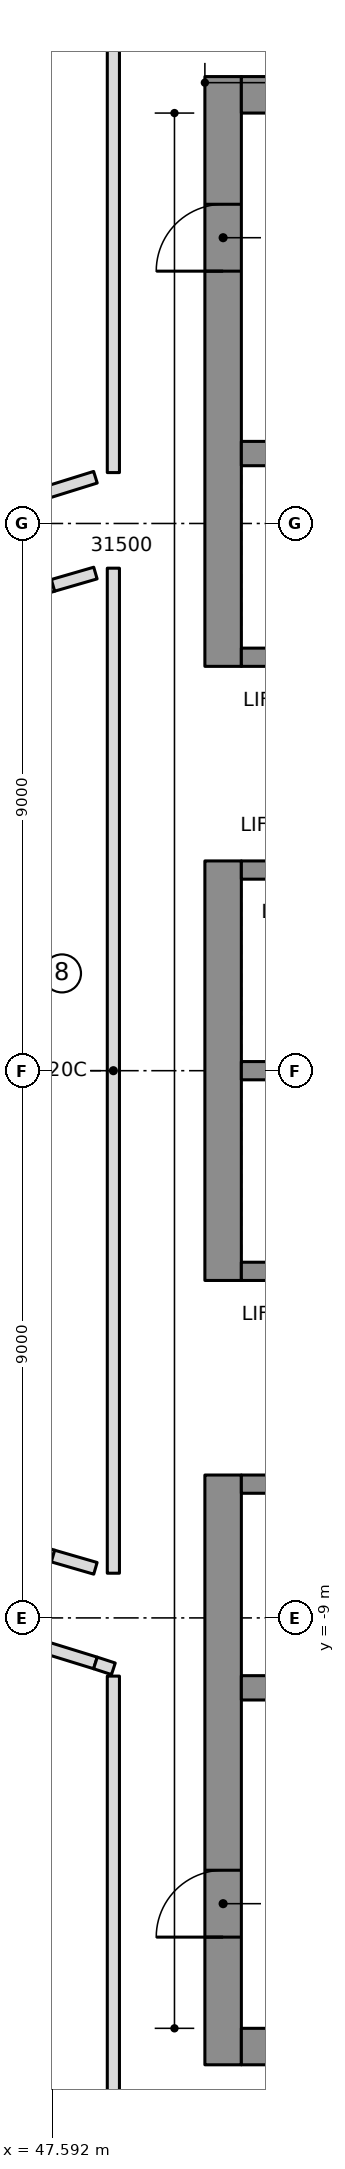
"""IFC4 building model, lengths in metres.
Left out: names, types, materials, properties, quantities, classifications, styles, units other than length and angle.
Written with IfcOpenShell. Run it as: python <this file> out.ifc"""

import sys

from ifc_helpers import new_model, si_unit, direction, frame, frame_2d, origin, place, context, subcontext, project, spatial, rectangle, extrude, element, fill, save


model = new_model("IFC4")
c1 = context("Model", 3, precision=1e-05, world=origin(), true_north=direction((0.0, 1.0)))
c2 = subcontext(c1, "Body", "Model", "MODEL_VIEW")
j1 = project(units=[si_unit("LENGTHUNIT", "METRE"), si_unit("PLANEANGLEUNIT", "RADIAN")], contexts=[c1])
p1 = place(None, origin())
s1 = spatial("IfcSite", under=j1, at=p1, CompositionType="ELEMENT")
p2 = place(p1, origin())
s2 = spatial("IfcBuilding", under=s1, at=p2, CompositionType="ELEMENT")
p3 = place(p2, frame((0.0, 0.0, 231.45)))
s3 = spatial("IfcBuildingStorey", under=s2, at=p3, CompositionType="ELEMENT", Elevation=231.45)
p4 = place(p3, frame((50.4, 6.65, 0.0), z_axis=(0.0, 0.0, 1.0), x_axis=(0.0, 1.0, 0.0)))
e1 = element("IfcWall", 1, at=p4, inside=s3, PredefinedType="SHEAR", context=c2, shape_type="SweptSolid", body=[
    extrude(rectangle(XDim=9.7, YDim=0.6, at=frame_2d((4.85, 0.0))), origin(), (0.0, 0.0, 1.0), 3.55),
])
p5 = place(p4, frame((6.5, 0.0, 0.0)))
e2 = element("IfcOpeningElement", 2, at=p5, cuts=e1, PredefinedType="OPENING", context=c2, shape_type="SweptSolid", body=[
    extrude(rectangle(XDim=1.1, YDim=2.1, at=frame_2d((0.55, 1.05))), frame((0.0, 0.31, 0.0), z_axis=(0.0, -1.0, 0.0), x_axis=(1.0, 0.0, 0.0)), (0.0, 0.0, 1.0), 0.62),
])
p6 = place(p3, frame((50.4, -3.45, 0.0), z_axis=(0.0, 0.0, 1.0), x_axis=(0.0, 1.0, 0.0)))
e3 = element("IfcWall", 3, at=p6, inside=s3, PredefinedType="SHEAR", context=c2, shape_type="SweptSolid", body=[
    extrude(rectangle(XDim=6.9, YDim=0.6, at=frame_2d((3.45, 0.0))), origin(), (0.0, 0.0, 1.0), 3.55),
])
p7 = place(p3, frame((50.4, -16.35, 0.0), z_axis=(0.0, 0.0, 1.0), x_axis=(0.0, 1.0, 0.0)))
e4 = element("IfcWall", 4, at=p7, inside=s3, PredefinedType="SHEAR", context=c2, shape_type="SweptSolid", body=[
    extrude(rectangle(XDim=9.7, YDim=0.6, at=frame_2d((4.85, 0.0))), origin(), (0.0, 0.0, 1.0), 3.55),
])
p8 = place(p7, frame((2.1, 0.0, 0.0)))
e5 = element("IfcOpeningElement", 5, at=p8, cuts=e4, PredefinedType="OPENING", context=c2, shape_type="SweptSolid", body=[
    extrude(rectangle(XDim=1.1, YDim=2.1, at=frame_2d((0.55, 1.05))), frame((0.0, 0.31, 0.0), z_axis=(0.0, -1.0, 0.0), x_axis=(1.0, 0.0, 0.0)), (0.0, 0.0, 1.0), 0.62),
])
for number, where, z_axis, x_axis in (
    (6, (50.7, 16.05, 0.0), (0.0, 0.0, 1.0), (1.0, 0.0, 0.0)),
    (7, (50.7, -16.05, 0.0), (0.0, 0.0, 1.0), (1.0, 0.0, 0.0)),
):
    element("IfcWall", number, at=place(p3, frame(where, z_axis=z_axis, x_axis=x_axis)), inside=s3, PredefinedType="SHEAR", context=c2, shape_type="SweptSolid", body=[
        extrude(rectangle(XDim=13.62, YDim=0.6, at=frame_2d((6.81, 0.0))), origin(), (0.0, 0.0, 1.0), 3.55),
    ])
p9 = place(p3, frame((50.7, 10.15, 0.0), z_axis=(0.0, 0.0, 1.0), x_axis=(1.0, 0.0, 0.0)))
e8 = element("IfcWall", 8, at=p9, inside=s3, PredefinedType="SHEAR", context=c2, shape_type="SweptSolid", body=[
    extrude(rectangle(XDim=13.02, YDim=0.4, at=frame_2d((6.51, 0.0))), origin(), (0.0, 0.0, 1.0), 3.55),
])
p10 = place(p9, frame((0.7, 0.0, 0.0)))
e9 = element("IfcOpeningElement", 9, at=p10, cuts=e8, PredefinedType="OPENING", context=c2, shape_type="SweptSolid", body=[
    extrude(rectangle(XDim=1.1, YDim=2.1, at=frame_2d((0.55, 1.05))), frame((0.0, 0.21, 0.0), z_axis=(0.0, -1.0, 0.0), x_axis=(1.0, 0.0, 0.0)), (0.0, 0.0, 1.0), 0.42),
])
p11 = place(p9, frame((3.5, 0.0, 0.0)))
e10 = element("IfcOpeningElement", 10, at=p11, cuts=e8, PredefinedType="OPENING", context=c2, shape_type="SweptSolid", body=[
    extrude(rectangle(XDim=1.1, YDim=2.1, at=frame_2d((0.55, 1.05))), frame((0.0, 0.21, 0.0), z_axis=(0.0, -1.0, 0.0), x_axis=(1.0, 0.0, 0.0)), (0.0, 0.0, 1.0), 0.42),
])
p12 = place(p3, frame((50.7, -10.15, 0.0), z_axis=(0.0, 0.0, 1.0), x_axis=(1.0, 0.0, 0.0)))
e11 = element("IfcWall", 11, at=p12, inside=s3, PredefinedType="SHEAR", context=c2, shape_type="SweptSolid", body=[
    extrude(rectangle(XDim=13.02, YDim=0.4, at=frame_2d((6.51, 0.0))), origin(), (0.0, 0.0, 1.0), 3.55),
])
p13 = place(p3, frame((50.7, 0.0, 0.0), z_axis=(0.0, 0.0, 1.0), x_axis=(1.0, 0.0, 0.0)))
e12 = element("IfcWall", 12, at=p13, inside=s3, PredefinedType="SHEAR", context=c2, shape_type="SweptSolid", body=[
    extrude(rectangle(XDim=10.9, YDim=0.3, at=frame_2d((5.45, 0.0))), origin(), (0.0, 0.0, 1.0), 3.55),
])
p14 = place(p3, frame((50.7, 3.3, 0.0), z_axis=(0.0, 0.0, 1.0), x_axis=(1.0, 0.0, 0.0)))
e13 = element("IfcWall", 13, at=p14, inside=s3, PredefinedType="SHEAR", context=c2, shape_type="SweptSolid", body=[
    extrude(rectangle(XDim=10.9, YDim=0.3, at=frame_2d((5.45, 0.0))), origin(), (0.0, 0.0, 1.0), 3.55),
])
p15 = place(p14, frame((0.7, 0.0, 0.0)))
e14 = element("IfcOpeningElement", 14, at=p15, cuts=e13, PredefinedType="OPENING", context=c2, shape_type="SweptSolid", body=[
    extrude(rectangle(XDim=1.1, YDim=2.1, at=frame_2d((0.55, 1.05))), frame((0.0, 0.16, 0.0), z_axis=(0.0, -1.0, 0.0), x_axis=(1.0, 0.0, 0.0)), (0.0, 0.0, 1.0), 0.32),
])
p16 = place(p14, frame((3.5, 0.0, 0.0)))
e15 = element("IfcOpeningElement", 15, at=p16, cuts=e13, PredefinedType="OPENING", context=c2, shape_type="SweptSolid", body=[
    extrude(rectangle(XDim=1.1, YDim=2.1, at=frame_2d((0.55, 1.05))), frame((0.0, 0.16, 0.0), z_axis=(0.0, -1.0, 0.0), x_axis=(1.0, 0.0, 0.0)), (0.0, 0.0, 1.0), 0.32),
])
p17 = place(p14, frame((6.4, 0.0, 0.0)))
e16 = element("IfcOpeningElement", 16, at=p17, cuts=e13, PredefinedType="OPENING", context=c2, shape_type="SweptSolid", body=[
    extrude(rectangle(XDim=0.9, YDim=2.1, at=frame_2d((0.45, 1.05))), frame((0.0, 0.16, 0.0), z_axis=(0.0, -1.0, 0.0), x_axis=(1.0, 0.0, 0.0)), (0.0, 0.0, 1.0), 0.32),
])
p18 = place(p14, frame((9.2, 0.0, 0.0)))
e17 = element("IfcOpeningElement", 17, at=p18, cuts=e13, PredefinedType="OPENING", context=c2, shape_type="SweptSolid", body=[
    extrude(rectangle(XDim=0.9, YDim=2.1, at=frame_2d((0.45, 1.05))), frame((0.0, 0.16, 0.0), z_axis=(0.0, -1.0, 0.0), x_axis=(1.0, 0.0, 0.0)), (0.0, 0.0, 1.0), 0.32),
])
p19 = place(p3, frame((50.7, 6.8, 0.0), z_axis=(0.0, 0.0, 1.0), x_axis=(1.0, 0.0, 0.0)))
e18 = element("IfcWall", 18, at=p19, inside=s3, PredefinedType="SHEAR", context=c2, shape_type="SweptSolid", body=[
    extrude(rectangle(XDim=10.9, YDim=0.3, at=frame_2d((5.45, 0.0))), origin(), (0.0, 0.0, 1.0), 3.55),
])
p20 = place(p19, frame((6.4, 0.0, 0.0)))
e19 = element("IfcOpeningElement", 19, at=p20, cuts=e18, PredefinedType="OPENING", context=c2, shape_type="SweptSolid", body=[
    extrude(rectangle(XDim=0.9, YDim=2.1, at=frame_2d((0.45, 1.05))), frame((0.0, 0.16, 0.0), z_axis=(0.0, -1.0, 0.0), x_axis=(1.0, 0.0, 0.0)), (0.0, 0.0, 1.0), 0.32),
])
p21 = place(p19, frame((9.2, 0.0, 0.0)))
e20 = element("IfcOpeningElement", 20, at=p21, cuts=e18, PredefinedType="OPENING", context=c2, shape_type="SweptSolid", body=[
    extrude(rectangle(XDim=0.9, YDim=2.1, at=frame_2d((0.45, 1.05))), frame((0.0, 0.16, 0.0), z_axis=(0.0, -1.0, 0.0), x_axis=(1.0, 0.0, 0.0)), (0.0, 0.0, 1.0), 0.32),
])
p22 = place(p3, frame((50.7, -3.3, 0.0), z_axis=(0.0, 0.0, 1.0), x_axis=(1.0, 0.0, 0.0)))
e21 = element("IfcWall", 21, at=p22, inside=s3, PredefinedType="SHEAR", context=c2, shape_type="SweptSolid", body=[
    extrude(rectangle(XDim=10.9, YDim=0.3, at=frame_2d((5.45, 0.0))), origin(), (0.0, 0.0, 1.0), 3.55),
])
p23 = place(p22, frame((9.1, 0.0, 0.0)))
e22 = element("IfcOpeningElement", 22, at=p23, cuts=e21, PredefinedType="OPENING", context=c2, shape_type="SweptSolid", body=[
    extrude(rectangle(XDim=1.1, YDim=2.1, at=frame_2d((0.55, 1.05))), frame((0.0, 0.16, 0.0), z_axis=(0.0, -1.0, 0.0), x_axis=(1.0, 0.0, 0.0)), (0.0, 0.0, 1.0), 0.32),
])
p24 = place(p3, frame((50.7, -6.8, 0.0), z_axis=(0.0, 0.0, 1.0), x_axis=(1.0, 0.0, 0.0)))
e23 = element("IfcWall", 23, at=p24, inside=s3, PredefinedType="SHEAR", context=c2, shape_type="SweptSolid", body=[
    extrude(rectangle(XDim=10.9, YDim=0.3, at=frame_2d((5.45, 0.0))), origin(), (0.0, 0.0, 1.0), 3.55),
])
p25 = place(p24, frame((6.3, 0.0, 0.0)))
e24 = element("IfcOpeningElement", 24, at=p25, cuts=e23, PredefinedType="OPENING", context=c2, shape_type="SweptSolid", body=[
    extrude(rectangle(XDim=1.1, YDim=2.1, at=frame_2d((0.55, 1.05))), frame((0.0, 0.16, 0.0), z_axis=(0.0, -1.0, 0.0), x_axis=(1.0, 0.0, 0.0)), (0.0, 0.0, 1.0), 0.32),
])
p26 = place(p24, frame((9.1, 0.0, 0.0)))
e25 = element("IfcOpeningElement", 25, at=p26, cuts=e23, PredefinedType="OPENING", context=c2, shape_type="SweptSolid", body=[
    extrude(rectangle(XDim=1.1, YDim=2.1, at=frame_2d((0.55, 1.05))), frame((0.0, 0.16, 0.0), z_axis=(0.0, -1.0, 0.0), x_axis=(1.0, 0.0, 0.0)), (0.0, 0.0, 1.0), 0.32),
])
p27 = place(p24, frame((0.8, 0.0, 0.0)))
e26 = element("IfcOpeningElement", 26, at=p27, cuts=e23, PredefinedType="OPENING", context=c2, shape_type="SweptSolid", body=[
    extrude(rectangle(XDim=0.9, YDim=2.1, at=frame_2d((0.45, 1.05))), frame((0.0, 0.16, 0.0), z_axis=(0.0, -1.0, 0.0), x_axis=(1.0, 0.0, 0.0)), (0.0, 0.0, 1.0), 0.32),
])
p28 = place(p24, frame((3.6, 0.0, 0.0)))
e27 = element("IfcOpeningElement", 27, at=p28, cuts=e23, PredefinedType="OPENING", context=c2, shape_type="SweptSolid", body=[
    extrude(rectangle(XDim=0.9, YDim=2.1, at=frame_2d((0.45, 1.05))), frame((0.0, 0.16, 0.0), z_axis=(0.0, -1.0, 0.0), x_axis=(1.0, 0.0, 0.0)), (0.0, 0.0, 1.0), 0.32),
])
for number, where, z_axis, x_axis in (
    (28, (46.85, 7.748, 0.0), (0.0, 0.0, 1.0), (0.955, 0.298, 0.0)),
    (29, (47.602, -7.982, 0.0), (0.0, 0.0, 1.0), (-0.955, 0.298, 0.0)),
):
    element("IfcWall", number, at=place(p3, frame(where, z_axis=z_axis, x_axis=x_axis)), inside=s3, PredefinedType="PARTITIONING", context=c2, shape_type="SweptSolid", body=[
        extrude(rectangle(XDim=0.788, YDim=0.2, at=frame_2d((0.394, 0.0))), origin(), (0.0, 0.0, 1.0), 3.25),
    ])
p29 = place(p3, frame((41.898, 7.764, 0.0), z_axis=(0.0, 0.0, 1.0), x_axis=(0.954667015156, 0.297675813886, 0.0)))
e30 = element("IfcWall", 30, at=p29, inside=s3, PredefinedType="PARTITIONING", context=c2, shape_type="SweptSolid", body=[
    extrude(rectangle(XDim=6.706, YDim=0.2, at=frame_2d((3.353, 0.0))), origin(), (0.0, 0.0, 1.0), 3.25),
])
p30 = place(p29, frame((3.95, 0.0, 0.0)))
e31 = element("IfcOpeningElement", 31, at=p30, cuts=e30, PredefinedType="OPENING", context=c2, shape_type="SweptSolid", body=[
    extrude(rectangle(XDim=1.5, YDim=2.1, at=frame_2d((0.75, 1.05))), frame((0.0, 0.11, 0.0), z_axis=(0.0, -1.0, 0.0), x_axis=(1.0, 0.0, 0.0)), (0.0, 0.0, 1.0), 0.22),
])
p31 = place(p3, frame((41.898, -7.764, 0.0), z_axis=(0.0, 0.0, 1.0), x_axis=(0.955502033518, -0.294984514752, 0.0)))
e32 = element("IfcWall", 32, at=p31, inside=s3, PredefinedType="PARTITIONING", context=c2, shape_type="SweptSolid", body=[
    extrude(rectangle(XDim=6.7, YDim=0.2, at=frame_2d((3.35, 0.0))), origin(), (0.0, 0.0, 1.0), 3.25),
])
p32 = place(p31, frame((3.95, 0.0, 0.0)))
e33 = element("IfcOpeningElement", 33, at=p32, cuts=e32, PredefinedType="OPENING", context=c2, shape_type="SweptSolid", body=[
    extrude(rectangle(XDim=1.5, YDim=2.1, at=frame_2d((0.75, 1.05))), frame((0.0, 0.11, 0.0), z_axis=(0.0, -1.0, 0.0), x_axis=(1.0, 0.0, 0.0)), (0.0, 0.0, 1.0), 0.22),
])
for number, where, z_axis, x_axis in (
    (34, (47.602, 7.982, 0.0), (0.0, 0.0, 1.0), (0.96, 0.278, 0.0)),
    (35, (48.3, -8.185, 0.0), (0.0, 0.0, 1.0), (-0.96, 0.278, 0.0)),
):
    element("IfcWall", number, at=place(p3, frame(where, z_axis=z_axis, x_axis=x_axis)), inside=s3, PredefinedType="PARTITIONING", context=c2, shape_type="SweptSolid", body=[
        extrude(rectangle(XDim=0.727, YDim=0.2, at=frame_2d((0.363, 0.0))), origin(), (0.0, 0.0, 1.0), 3.25),
    ])
p33 = place(p3, frame((48.595, 8.265, 0.0), z_axis=(0.0, 0.0, 1.0), x_axis=(0.0, -1.0, 0.0)))
e36 = element("IfcWall", 36, at=p33, inside=s3, PredefinedType="PARTITIONING", context=c2, shape_type="SweptSolid", body=[
    extrude(rectangle(XDim=16.53, YDim=0.2, at=frame_2d((8.265, 0.0))), origin(), (0.0, 0.0, 1.0), 3.25),
])
p34 = place(p3, frame((48.595, 19.904, 0.0), z_axis=(0.0, 0.0, 1.0), x_axis=(0.0, -1.0, 0.0)))
e37 = element("IfcWall", 37, at=p34, inside=s3, PredefinedType="PARTITIONING", context=c2, shape_type="SweptSolid", body=[
    extrude(rectangle(XDim=10.067, YDim=0.2, at=frame_2d((5.034, 0.0))), origin(), (0.0, 0.0, 1.0), 3.25),
])
p35 = place(p3, frame((48.3, -9.741, 0.0), z_axis=(0.0, 0.0, 1.0), x_axis=(0.950709666312, -0.31008245739, 0.0)))
e38 = element("IfcWall", 38, at=p35, inside=s3, PredefinedType="PARTITIONING", context=c2, shape_type="SweptSolid", body=[
    extrude(rectangle(XDim=0.31, YDim=0.2, at=frame_2d((0.155, 0.0))), origin(), (0.0, 0.0, 1.0), 3.25),
])
p36 = place(p3, frame((48.595, -9.957, 0.0), z_axis=(0.0, 0.0, 1.0), x_axis=(0.0, -1.0, 0.0)))
e39 = element("IfcWall", 39, at=p36, inside=s3, PredefinedType="PARTITIONING", context=c2, shape_type="SweptSolid", body=[
    extrude(rectangle(XDim=9.947, YDim=0.2, at=frame_2d((4.974, 0.0))), origin(), (0.0, 0.0, 1.0), 3.25),
])
p37 = place(p5, origin())
e40 = element("IfcDoor", 40, at=p37, inside=s3, OperationType="SINGLE_SWING_RIGHT", PredefinedType="DOOR", context=c2, shape_type="SweptSolid", body=[
    extrude(rectangle(XDim=1.1, YDim=2.1, at=frame_2d((0.55, 1.05))), frame((0.0, 0.025, 0.0), z_axis=(0.0, -1.0, 0.0), x_axis=(1.0, 0.0, 0.0)), (0.0, 0.0, 1.0), 0.05),
])
fill(e2, e40)
p38 = place(p8, origin())
e41 = element("IfcDoor", 41, at=p38, inside=s3, OperationType="SINGLE_SWING_RIGHT", PredefinedType="DOOR", context=c2, shape_type="SweptSolid", body=[
    extrude(rectangle(XDim=1.1, YDim=2.1, at=frame_2d((0.55, 1.05))), frame((0.0, 0.025, 0.0), z_axis=(0.0, -1.0, 0.0), x_axis=(1.0, 0.0, 0.0)), (0.0, 0.0, 1.0), 0.05),
])
fill(e5, e41)
save(model, sys.argv[1])
